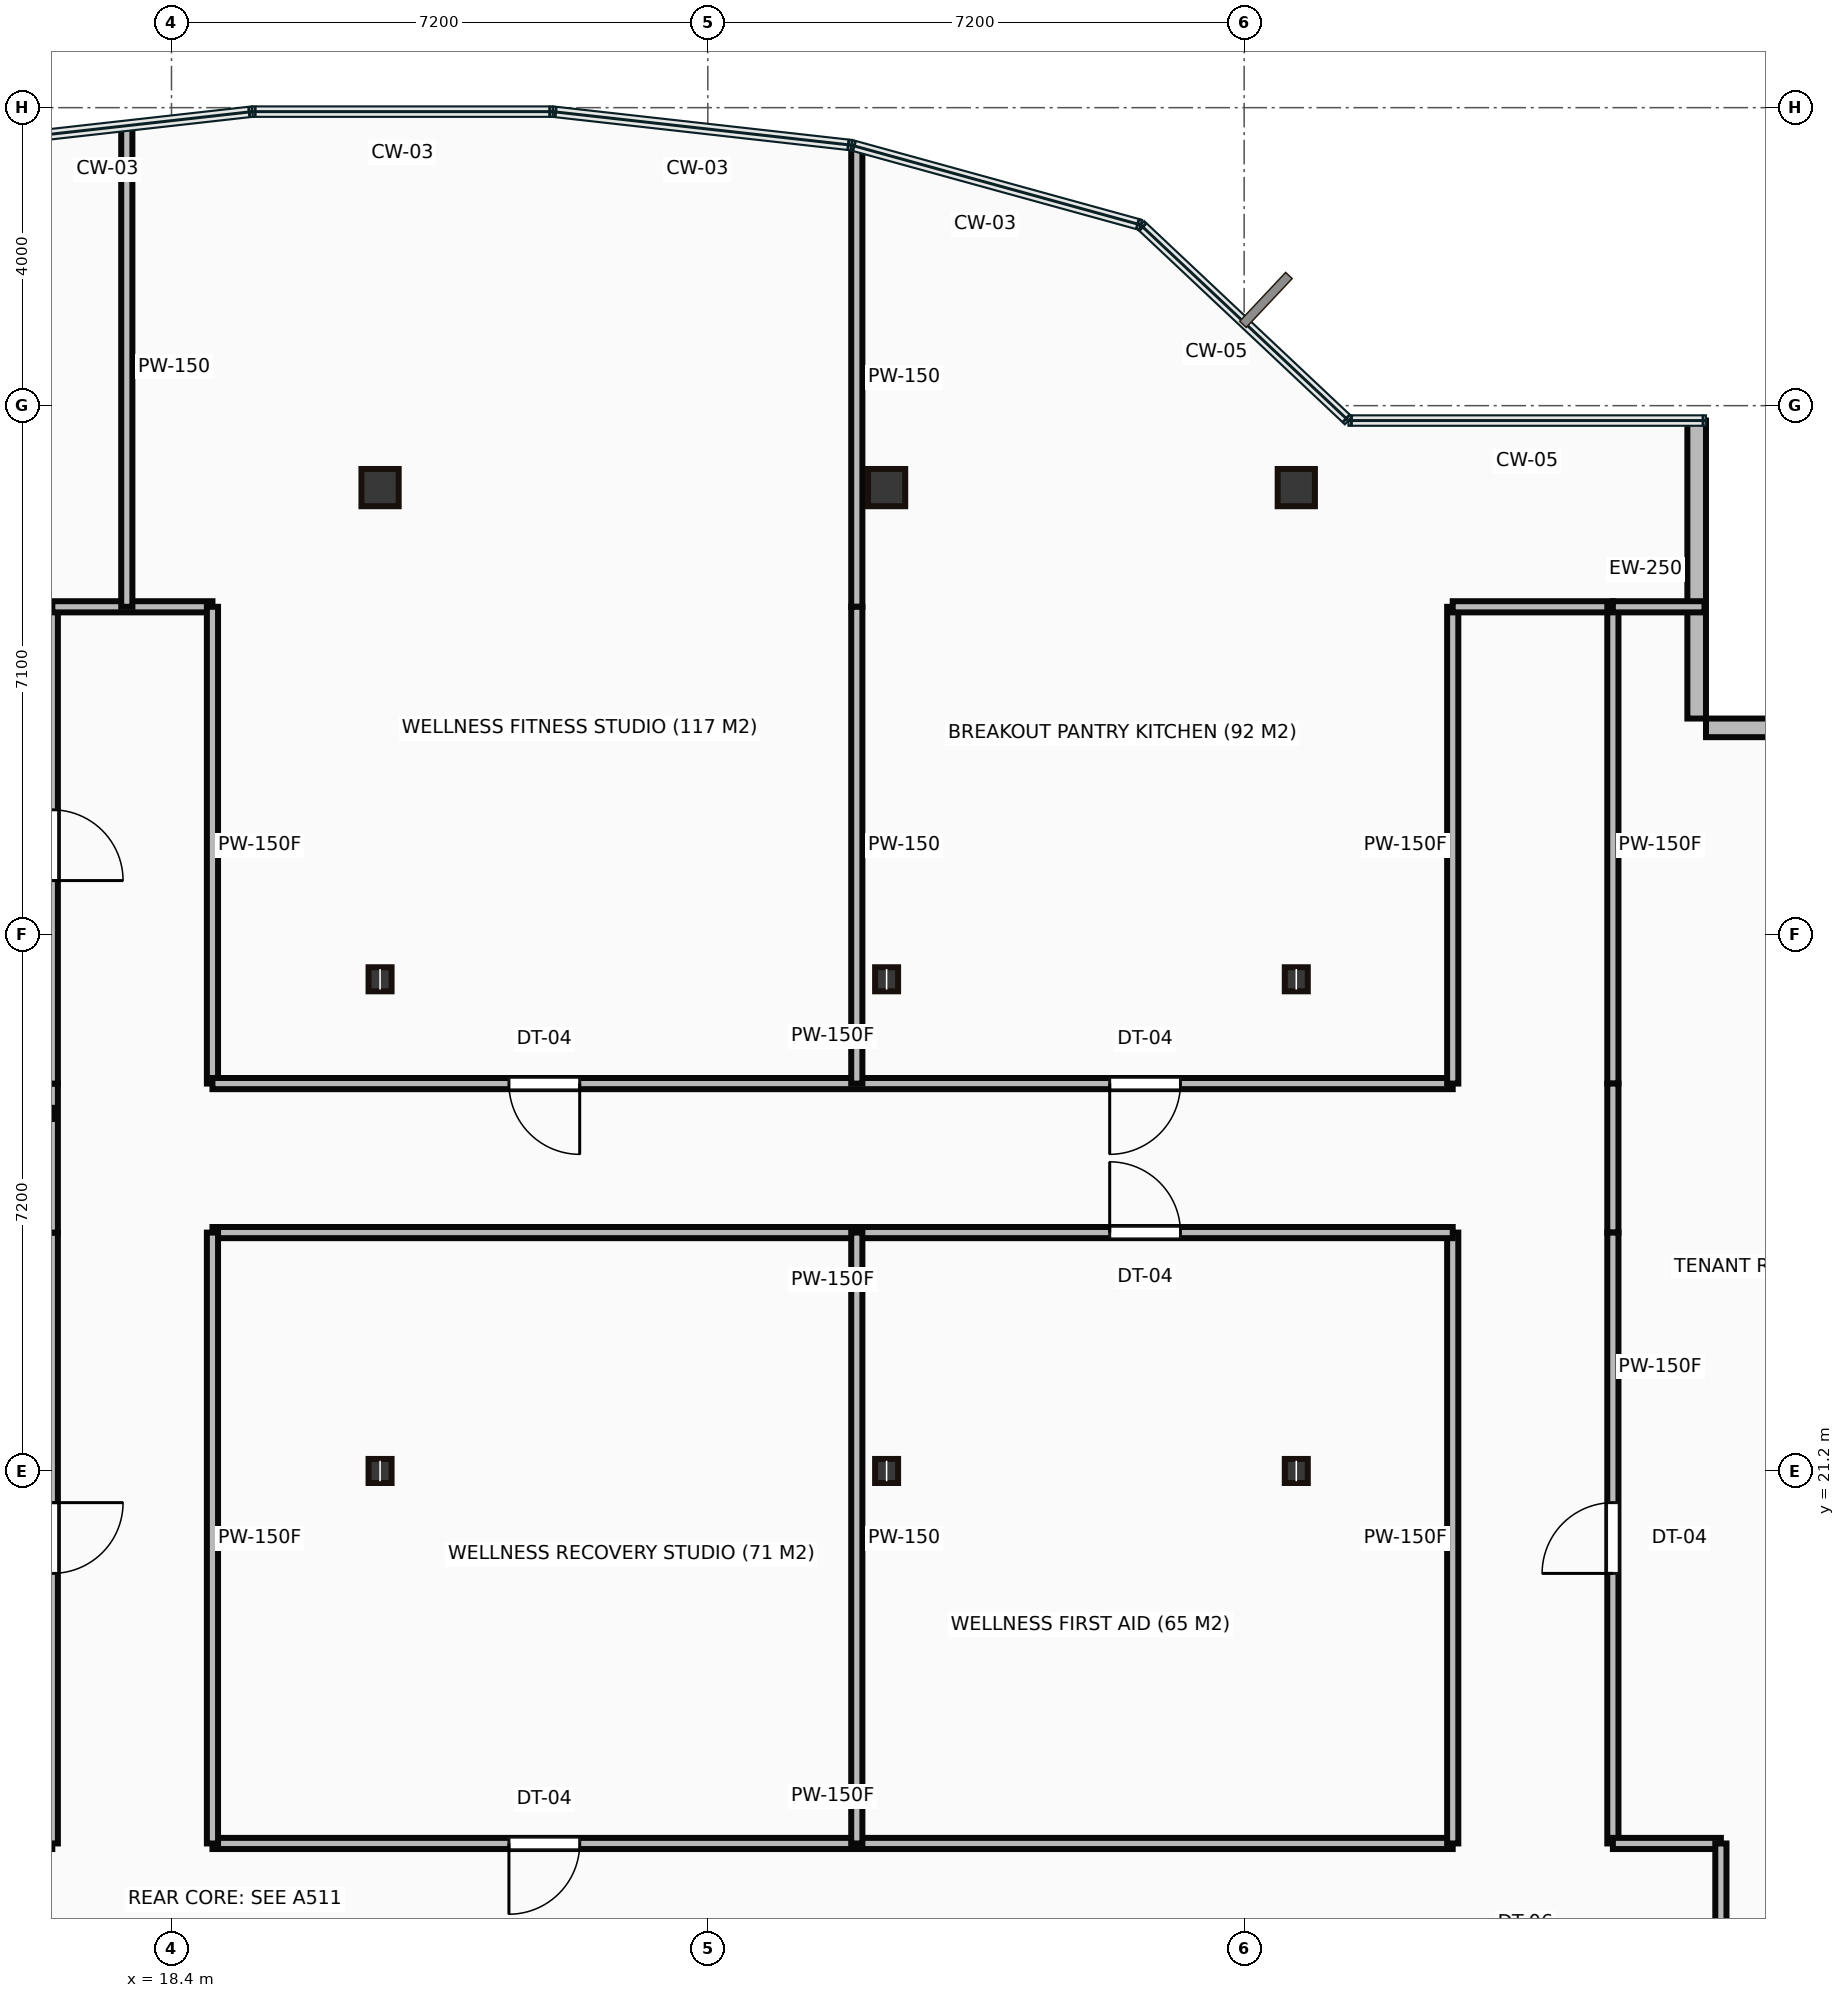
"""IFC4 building model, lengths in metres.
Left out: names, types, materials, properties, quantities, classifications, styles, units other than length and angle.
Written with IfcOpenShell. Run it as: python <this file> out.ifc"""

import sys

from ifc_helpers import new_model, si_unit, direction, frame, frame_2d, origin, origin_2d, place, context, subcontext, project, spatial, rectangle, hollow_rectangle, i_section, extrude, source, transform, mapped, element, fill, save


model = new_model("IFC4")
c1 = context("Model", 3, precision=1e-05, world=origin(), true_north=direction((0.0, 1.0)))
c2 = subcontext(c1, "Body", "Model", "MODEL_VIEW")
j1 = project(units=[si_unit("LENGTHUNIT", "METRE"), si_unit("PLANEANGLEUNIT", "RADIAN")], contexts=[c1])
p1 = place(None, origin())
s1 = spatial("IfcSite", under=j1, at=p1, CompositionType="ELEMENT")
p2 = place(p1, origin())
s2 = spatial("IfcBuilding", under=s1, at=p2, CompositionType="ELEMENT")
p3 = place(p2, frame((0.0, 0.0, 258.8)))
s3 = spatial("IfcBuildingStorey", under=s2, at=p3, CompositionType="ELEMENT", Elevation=258.8)
m1 = source(origin(), c2, "Body", "SweptSolid", [
    extrude(i_section(OverallWidth=0.309, OverallDepth=0.323, WebThickness=0.014, FlangeThickness=0.023, at=origin_2d()), origin(), (0.0, 0.0, 1.0), 3.65),
])
for number, where, z_axis, x_axis in (
    (1, (21.2, 21.2, 0.0), (0.0, 0.0, 1.0), (1.0, 0.0, 0.0)),
    (2, (21.2, 27.8, 0.0), (0.0, 0.0, 1.0), (1.0, 0.0, 0.0)),
):
    element("IfcColumn", number, at=place(p3, frame(where, z_axis=z_axis, x_axis=x_axis)), inside=s3, PredefinedType="COLUMN", context=c2, shape_type="MappedRepresentation", body=[
        mapped(m1, transform((0.0, 0.0, 0.0))),
    ])
m2 = source(origin(), c2, "Body", "SweptSolid", [
    extrude(hollow_rectangle(XDim=0.5, YDim=0.5, WallThickness=0.022, at=origin_2d()), origin(), (0.0, 0.0, 1.0), 3.65),
])
p4 = place(p3, frame((21.2, 34.4, 0.0), z_axis=(0.0, 0.0, 1.0), x_axis=(1.0, 0.0, 0.0)))
e3 = element("IfcColumn", 3, at=p4, inside=s3, PredefinedType="COLUMN", context=c2, shape_type="MappedRepresentation", body=[
    mapped(m2, transform((0.0, 0.0, 0.0))),
])
for number, where, z_axis, x_axis in (
    (4, (28.0, 21.2, 0.0), (0.0, 0.0, 1.0), (1.0, 0.0, 0.0)),
    (5, (28.0, 27.8, 0.0), (0.0, 0.0, 1.0), (1.0, 0.0, 0.0)),
):
    element("IfcColumn", number, at=place(p3, frame(where, z_axis=z_axis, x_axis=x_axis)), inside=s3, PredefinedType="COLUMN", context=c2, shape_type="MappedRepresentation", body=[
        mapped(m1, transform((0.0, 0.0, 0.0))),
    ])
p5 = place(p3, frame((28.0, 34.4, 0.0), z_axis=(0.0, 0.0, 1.0), x_axis=(1.0, 0.0, 0.0)))
e6 = element("IfcColumn", 6, at=p5, inside=s3, PredefinedType="COLUMN", context=c2, shape_type="MappedRepresentation", body=[
    mapped(m2, transform((0.0, 0.0, 0.0))),
])
for number, where, z_axis, x_axis in (
    (7, (33.5, 21.2, 0.0), (0.0, 0.0, 1.0), (1.0, 0.0, 0.0)),
    (8, (33.5, 27.8, 0.0), (0.0, 0.0, 1.0), (1.0, 0.0, 0.0)),
):
    element("IfcColumn", number, at=place(p3, frame(where, z_axis=z_axis, x_axis=x_axis)), inside=s3, PredefinedType="COLUMN", context=c2, shape_type="MappedRepresentation", body=[
        mapped(m1, transform((0.0, 0.0, 0.0))),
    ])
p6 = place(p3, frame((33.5, 34.4, 0.0), z_axis=(0.0, 0.0, 1.0), x_axis=(1.0, 0.0, 0.0)))
e9 = element("IfcColumn", 9, at=p6, inside=s3, PredefinedType="COLUMN", context=c2, shape_type="MappedRepresentation", body=[
    mapped(m2, transform((0.0, 0.0, 0.0))),
])
m3 = source(origin(), c2, "Body", "SweptSolid", [
    extrude(rectangle(XDim=4.0, YDim=0.25, at=frame_2d((2.0, 0.0))), origin(), (0.0, 0.0, 1.0), 3.4),
])
for number, where, z_axis, x_axis in (
    (10, (43.0, 31.175, 0.0), (0.0, 0.0, 1.0), (-1.0, 0.0, 0.0)),
    (11, (38.875, 31.3, 0.0), (0.0, 0.0, 1.0), (0.0, 1.0, 0.0)),
):
    element("IfcWall", number, at=place(p3, frame(where, z_axis=z_axis, x_axis=x_axis)), inside=s3, PredefinedType="STANDARD", context=c2, shape_type="MappedRepresentation", body=[
        mapped(m3, transform((0.0, 0.0, 0.0))),
    ])
m4 = source(origin(), c2, "Body", "SweptSolid", [
    extrude(rectangle(XDim=12.2, YDim=0.15, at=frame_2d((6.1, 0.0))), origin(), (0.0, 0.0, 1.0), 3.4),
])
p7 = place(p3, frame((4.6, 16.2, 0.0), z_axis=(0.0, 0.0, 1.0), x_axis=(1.0, 0.0, 0.0)))
e12 = element("IfcWall", 12, at=p7, inside=s3, PredefinedType="PARTITIONING", context=c2, shape_type="MappedRepresentation", body=[
    mapped(m4, transform((0.0, 0.0, 0.0))),
])
p8 = place(p7, frame((1.855, 0.0, 0.0)))
e13 = element("IfcOpeningElement", 13, at=p8, cuts=e12, PredefinedType="OPENING", context=c2, shape_type="SweptSolid", body=[
    extrude(rectangle(XDim=0.95, YDim=2.15, at=frame_2d((0.475, 1.075))), frame((0.0, 0.085, 0.0), z_axis=(0.0, -1.0, 0.0), x_axis=(1.0, 0.0, 0.0)), (0.0, 0.0, 1.0), 0.17),
])
m5 = source(origin(), c2, "Body", "SweptSolid", [
    extrude(rectangle(XDim=8.2, YDim=0.15, at=frame_2d((4.1, 0.0))), origin(), (0.0, 0.0, 1.0), 3.4),
])
p9 = place(p3, frame((16.8, 16.2, 0.0), z_axis=(0.0, 0.0, 1.0), x_axis=(0.0, 1.0, 0.0)))
e14 = element("IfcWall", 14, at=p9, inside=s3, PredefinedType="PARTITIONING", context=c2, shape_type="MappedRepresentation", body=[
    mapped(m5, transform((0.0, 0.0, 0.0))),
])
p10 = place(p9, frame((3.625, 0.0, 0.0)))
e15 = element("IfcOpeningElement", 15, at=p10, cuts=e14, PredefinedType="OPENING", context=c2, shape_type="SweptSolid", body=[
    extrude(rectangle(XDim=0.95, YDim=2.15, at=frame_2d((0.475, 1.075))), frame((0.0, 0.085, 0.0), z_axis=(0.0, -1.0, 0.0), x_axis=(1.0, 0.0, 0.0)), (0.0, 0.0, 1.0), 0.17),
])
m6 = source(origin(), c2, "Body", "SweptSolid", [
    extrude(rectangle(XDim=2.0, YDim=0.15, at=frame_2d((1.0, 0.0))), origin(), (0.0, 0.0, 1.0), 3.4),
])
p11 = place(p3, frame((16.8, 24.4, 0.0), z_axis=(0.0, 0.0, 1.0), x_axis=(0.0, 1.0, 0.0)))
e16 = element("IfcWall", 16, at=p11, inside=s3, PredefinedType="PARTITIONING", context=c2, shape_type="MappedRepresentation", body=[
    mapped(m6, transform((0.0, 0.0, 0.0))),
])
m7 = source(origin(), c2, "Body", "SweptSolid", [
    extrude(rectangle(XDim=6.4, YDim=0.15, at=frame_2d((3.2, 0.0))), origin(), (0.0, 0.0, 1.0), 3.4),
])
p12 = place(p3, frame((16.8, 26.4, 0.0), z_axis=(0.0, 0.0, 1.0), x_axis=(0.0, 1.0, 0.0)))
e17 = element("IfcWall", 17, at=p12, inside=s3, PredefinedType="PARTITIONING", context=c2, shape_type="MappedRepresentation", body=[
    mapped(m7, transform((0.0, 0.0, 0.0))),
])
p13 = place(p12, frame((2.725, 0.0, 0.0)))
e18 = element("IfcOpeningElement", 18, at=p13, cuts=e17, PredefinedType="OPENING", context=c2, shape_type="SweptSolid", body=[
    extrude(rectangle(XDim=0.95, YDim=2.15, at=frame_2d((0.475, 1.075))), frame((0.0, 0.085, 0.0), z_axis=(0.0, -1.0, 0.0), x_axis=(1.0, 0.0, 0.0)), (0.0, 0.0, 1.0), 0.17),
])
m8 = source(origin(), c2, "Body", "SweptSolid", [
    extrude(rectangle(XDim=2.15, YDim=0.15, at=frame_2d((1.075, 0.0))), origin(), (0.0, 0.0, 1.0), 3.4),
])
p14 = place(p3, frame((16.8, 32.8, 0.0), z_axis=(0.0, 0.0, 1.0), x_axis=(1.0, 0.0, 0.0)))
e19 = element("IfcWall", 19, at=p14, inside=s3, PredefinedType="PARTITIONING", context=c2, shape_type="MappedRepresentation", body=[
    mapped(m8, transform((0.0, 0.0, 0.0))),
])
p15 = place(p3, frame((18.95, 32.8, 0.0), z_axis=(0.0, 0.0, 1.0), x_axis=(0.0, -1.0, 0.0)))
e20 = element("IfcWall", 20, at=p15, inside=s3, PredefinedType="PARTITIONING", context=c2, shape_type="MappedRepresentation", body=[
    mapped(m7, transform((0.0, 0.0, 0.0))),
])
m9 = source(origin(), c2, "Body", "SweptSolid", [
    extrude(rectangle(XDim=16.65, YDim=0.15, at=frame_2d((8.325, 0.0))), origin(), (0.0, 0.0, 1.0), 3.4),
])
p16 = place(p3, frame((18.95, 26.4, 0.0), z_axis=(0.0, 0.0, 1.0), x_axis=(1.0, 0.0, 0.0)))
e21 = element("IfcWall", 21, at=p16, inside=s3, PredefinedType="PARTITIONING", context=c2, shape_type="MappedRepresentation", body=[
    mapped(m9, transform((0.0, 0.0, 0.0))),
])
p17 = place(p16, frame((3.98, 0.0, 0.0)))
e22 = element("IfcOpeningElement", 22, at=p17, cuts=e21, PredefinedType="OPENING", context=c2, shape_type="SweptSolid", body=[
    extrude(rectangle(XDim=0.95, YDim=2.15, at=frame_2d((0.475, 1.075))), frame((0.0, 0.085, 0.0), z_axis=(0.0, -1.0, 0.0), x_axis=(1.0, 0.0, 0.0)), (0.0, 0.0, 1.0), 0.17),
])
p18 = place(p16, frame((12.045, 0.0, 0.0)))
e23 = element("IfcOpeningElement", 23, at=p18, cuts=e21, PredefinedType="OPENING", context=c2, shape_type="SweptSolid", body=[
    extrude(rectangle(XDim=0.95, YDim=2.15, at=frame_2d((0.475, 1.075))), frame((0.0, 0.085, 0.0), z_axis=(0.0, -1.0, 0.0), x_axis=(1.0, 0.0, 0.0)), (0.0, 0.0, 1.0), 0.17),
])
p19 = place(p3, frame((35.6, 26.4, 0.0), z_axis=(0.0, 0.0, 1.0), x_axis=(0.0, 1.0, 0.0)))
e24 = element("IfcWall", 24, at=p19, inside=s3, PredefinedType="PARTITIONING", context=c2, shape_type="MappedRepresentation", body=[
    mapped(m7, transform((0.0, 0.0, 0.0))),
])
p20 = place(p3, frame((35.6, 32.8, 0.0), z_axis=(0.0, 0.0, 1.0), x_axis=(1.0, 0.0, 0.0)))
e25 = element("IfcWall", 25, at=p20, inside=s3, PredefinedType="PARTITIONING", context=c2, shape_type="MappedRepresentation", body=[
    mapped(m8, transform((0.0, 0.0, 0.0))),
])
p21 = place(p3, frame((37.75, 32.8, 0.0), z_axis=(0.0, 0.0, 1.0), x_axis=(0.0, -1.0, 0.0)))
e26 = element("IfcWall", 26, at=p21, inside=s3, PredefinedType="PARTITIONING", context=c2, shape_type="MappedRepresentation", body=[
    mapped(m7, transform((0.0, 0.0, 0.0))),
])
p22 = place(p3, frame((37.75, 26.4, 0.0), z_axis=(0.0, 0.0, 1.0), x_axis=(0.0, -1.0, 0.0)))
e27 = element("IfcWall", 27, at=p22, inside=s3, PredefinedType="PARTITIONING", context=c2, shape_type="MappedRepresentation", body=[
    mapped(m6, transform((0.0, 0.0, 0.0))),
])
p23 = place(p3, frame((37.75, 24.4, 0.0), z_axis=(0.0, 0.0, 1.0), x_axis=(0.0, -1.0, 0.0)))
e28 = element("IfcWall", 28, at=p23, inside=s3, PredefinedType="PARTITIONING", context=c2, shape_type="MappedRepresentation", body=[
    mapped(m5, transform((0.0, 0.0, 0.0))),
])
p24 = place(p23, frame((3.625, 0.0, 0.0)))
e29 = element("IfcOpeningElement", 29, at=p24, cuts=e28, PredefinedType="OPENING", context=c2, shape_type="SweptSolid", body=[
    extrude(rectangle(XDim=0.95, YDim=2.15, at=frame_2d((0.475, 1.075))), frame((0.0, 0.085, 0.0), z_axis=(0.0, -1.0, 0.0), x_axis=(1.0, 0.0, 0.0)), (0.0, 0.0, 1.0), 0.17),
])
m10 = source(origin(), c2, "Body", "SweptSolid", [
    extrude(rectangle(XDim=1.45, YDim=0.15, at=frame_2d((0.725, 0.0))), origin(), (0.0, 0.0, 1.0), 3.4),
])
p25 = place(p3, frame((37.75, 16.2, 0.0), z_axis=(0.0, 0.0, 1.0), x_axis=(1.0, 0.0, 0.0)))
e30 = element("IfcWall", 30, at=p25, inside=s3, PredefinedType="PARTITIONING", context=c2, shape_type="MappedRepresentation", body=[
    mapped(m10, transform((0.0, 0.0, 0.0))),
])
m11 = source(origin(), c2, "Body", "SweptSolid", [
    extrude(rectangle(XDim=2.2, YDim=0.15, at=frame_2d((1.1, 0.0))), origin(), (0.0, 0.0, 1.0), 3.4),
])
p26 = place(p3, frame((39.2, 16.2, 0.0), z_axis=(0.0, 0.0, 1.0), x_axis=(0.0, -1.0, 0.0)))
e31 = element("IfcWall", 31, at=p26, inside=s3, PredefinedType="PARTITIONING", context=c2, shape_type="MappedRepresentation", body=[
    mapped(m11, transform((0.0, 0.0, 0.0))),
])
p27 = place(p3, frame((18.95, 16.2, 0.0), z_axis=(0.0, 0.0, 1.0), x_axis=(1.0, 0.0, 0.0)))
e32 = element("IfcWall", 32, at=p27, inside=s3, PredefinedType="PARTITIONING", context=c2, shape_type="MappedRepresentation", body=[
    mapped(m9, transform((0.0, 0.0, 0.0))),
])
p28 = place(p27, frame((3.98, 0.0, 0.0)))
e33 = element("IfcOpeningElement", 33, at=p28, cuts=e32, PredefinedType="OPENING", context=c2, shape_type="SweptSolid", body=[
    extrude(rectangle(XDim=0.95, YDim=2.15, at=frame_2d((0.475, 1.075))), frame((0.0, 0.085, 0.0), z_axis=(0.0, -1.0, 0.0), x_axis=(1.0, 0.0, 0.0)), (0.0, 0.0, 1.0), 0.17),
])
p29 = place(p3, frame((35.6, 16.2, 0.0), z_axis=(0.0, 0.0, 1.0), x_axis=(0.0, 1.0, 0.0)))
e34 = element("IfcWall", 34, at=p29, inside=s3, PredefinedType="PARTITIONING", context=c2, shape_type="MappedRepresentation", body=[
    mapped(m5, transform((0.0, 0.0, 0.0))),
])
p30 = place(p3, frame((35.6, 24.4, 0.0), z_axis=(0.0, 0.0, 1.0), x_axis=(-1.0, 0.0, 0.0)))
e35 = element("IfcWall", 35, at=p30, inside=s3, PredefinedType="PARTITIONING", context=c2, shape_type="MappedRepresentation", body=[
    mapped(m9, transform((0.0, 0.0, 0.0))),
])
p31 = place(p30, frame((3.655, 0.0, 0.0)))
e36 = element("IfcOpeningElement", 36, at=p31, cuts=e35, PredefinedType="OPENING", context=c2, shape_type="SweptSolid", body=[
    extrude(rectangle(XDim=0.95, YDim=2.15, at=frame_2d((0.475, 1.075))), frame((0.0, 0.085, 0.0), z_axis=(0.0, -1.0, 0.0), x_axis=(1.0, 0.0, 0.0)), (0.0, 0.0, 1.0), 0.17),
])
p32 = place(p3, frame((18.95, 24.4, 0.0), z_axis=(0.0, 0.0, 1.0), x_axis=(0.0, -1.0, 0.0)))
e37 = element("IfcWall", 37, at=p32, inside=s3, PredefinedType="PARTITIONING", context=c2, shape_type="MappedRepresentation", body=[
    mapped(m5, transform((0.0, 0.0, 0.0))),
])
m12 = source(origin(), c2, "Body", "SweptSolid", [
    extrude(rectangle(XDim=6.438, YDim=0.15, at=frame_2d((3.219, 0.0))), origin(), (0.0, 0.0, 1.0), 3.4),
])
p33 = place(p3, frame((17.8, 39.238, 0.0), z_axis=(0.0, 0.0, 1.0), x_axis=(0.0, -1.0, 0.0)))
e38 = element("IfcWall", 38, at=p33, inside=s3, PredefinedType="PARTITIONING", context=c2, shape_type="MappedRepresentation", body=[
    mapped(m12, transform((0.0, 0.0, 0.0))),
])
p34 = place(p3, frame((27.6, 24.4, 0.0), z_axis=(0.0, 0.0, 1.0), x_axis=(0.0, -1.0, 0.0)))
e39 = element("IfcWall", 39, at=p34, inside=s3, PredefinedType="PARTITIONING", context=c2, shape_type="MappedRepresentation", body=[
    mapped(m5, transform((0.0, 0.0, 0.0))),
])
m13 = source(origin(), c2, "Body", "SweptSolid", [
    extrude(rectangle(XDim=6.156, YDim=0.15, at=frame_2d((3.078, 0.0))), origin(), (0.0, 0.0, 1.0), 3.4),
])
p35 = place(p3, frame((27.6, 38.956, 0.0), z_axis=(0.0, 0.0, 1.0), x_axis=(0.0, -1.0, 0.0)))
e40 = element("IfcWall", 40, at=p35, inside=s3, PredefinedType="PARTITIONING", context=c2, shape_type="MappedRepresentation", body=[
    mapped(m13, transform((0.0, 0.0, 0.0))),
])
p36 = place(p3, frame((27.6, 32.8, 0.0), z_axis=(0.0, 0.0, 1.0), x_axis=(0.0, -1.0, 0.0)))
e41 = element("IfcWall", 41, at=p36, inside=s3, PredefinedType="PARTITIONING", context=c2, shape_type="MappedRepresentation", body=[
    mapped(m7, transform((0.0, 0.0, 0.0))),
])
m14 = source(origin(), c2, "Body", "SweptSolid", [
    extrude(rectangle(XDim=1.23, YDim=0.15, at=frame_2d((0.615, 0.0))), origin(), (0.0, 0.0, 1.0), 3.4),
])
p37 = place(p3, frame((38.98, 32.8, 0.0), z_axis=(0.0, 0.0, 1.0), x_axis=(-1.0, 0.0, 0.0)))
e42 = element("IfcWall", 42, at=p37, inside=s3, PredefinedType="PARTITIONING", context=c2, shape_type="MappedRepresentation", body=[
    mapped(m14, transform((0.0, 0.0, 0.0))),
])
m15 = source(origin(), c2, "Body", "SweptSolid", [
    extrude(rectangle(XDim=0.95, YDim=2.15, at=frame_2d((0.475, 1.075))), frame((0.0, 0.025, 0.0), z_axis=(0.0, -1.0, 0.0), x_axis=(1.0, 0.0, 0.0)), (0.0, 0.0, 1.0), 0.05),
])
p38 = place(p10, origin())
e43 = element("IfcDoor", 43, at=p38, inside=s3, OperationType="SINGLE_SWING_RIGHT", PredefinedType="DOOR", context=c2, shape_type="MappedRepresentation", body=[
    mapped(m15, transform((0.0, 0.0, 0.0))),
])
fill(e15, e43)
p39 = place(p13, origin())
e44 = element("IfcDoor", 44, at=p39, inside=s3, OperationType="SINGLE_SWING_LEFT", PredefinedType="DOOR", context=c2, shape_type="MappedRepresentation", body=[
    mapped(m15, transform((0.0, 0.0, 0.0))),
])
fill(e18, e44)
p40 = place(p17, origin())
e45 = element("IfcDoor", 45, at=p40, inside=s3, OperationType="SINGLE_SWING_RIGHT", PredefinedType="DOOR", context=c2, shape_type="MappedRepresentation", body=[
    mapped(m15, transform((0.0, 0.0, 0.0))),
])
fill(e22, e45)
p41 = place(p28, origin())
e46 = element("IfcDoor", 46, at=p41, inside=s3, OperationType="SINGLE_SWING_LEFT", PredefinedType="DOOR", context=c2, shape_type="MappedRepresentation", body=[
    mapped(m15, transform((0.0, 0.0, 0.0))),
])
fill(e33, e46)
p42 = place(p31, origin())
e47 = element("IfcDoor", 47, at=p42, inside=s3, OperationType="SINGLE_SWING_RIGHT", PredefinedType="DOOR", context=c2, shape_type="MappedRepresentation", body=[
    mapped(m15, transform((0.0, 0.0, 0.0))),
])
fill(e36, e47)
p43 = place(p18, origin())
e48 = element("IfcDoor", 48, at=p43, inside=s3, OperationType="SINGLE_SWING_LEFT", PredefinedType="DOOR", context=c2, shape_type="MappedRepresentation", body=[
    mapped(m15, transform((0.0, 0.0, 0.0))),
])
fill(e23, e48)
p44 = place(p24, origin())
e49 = element("IfcDoor", 49, at=p44, inside=s3, OperationType="SINGLE_SWING_RIGHT", PredefinedType="DOOR", context=c2, shape_type="MappedRepresentation", body=[
    mapped(m15, transform((0.0, 0.0, 0.0))),
])
fill(e29, e49)
save(model, sys.argv[1])
